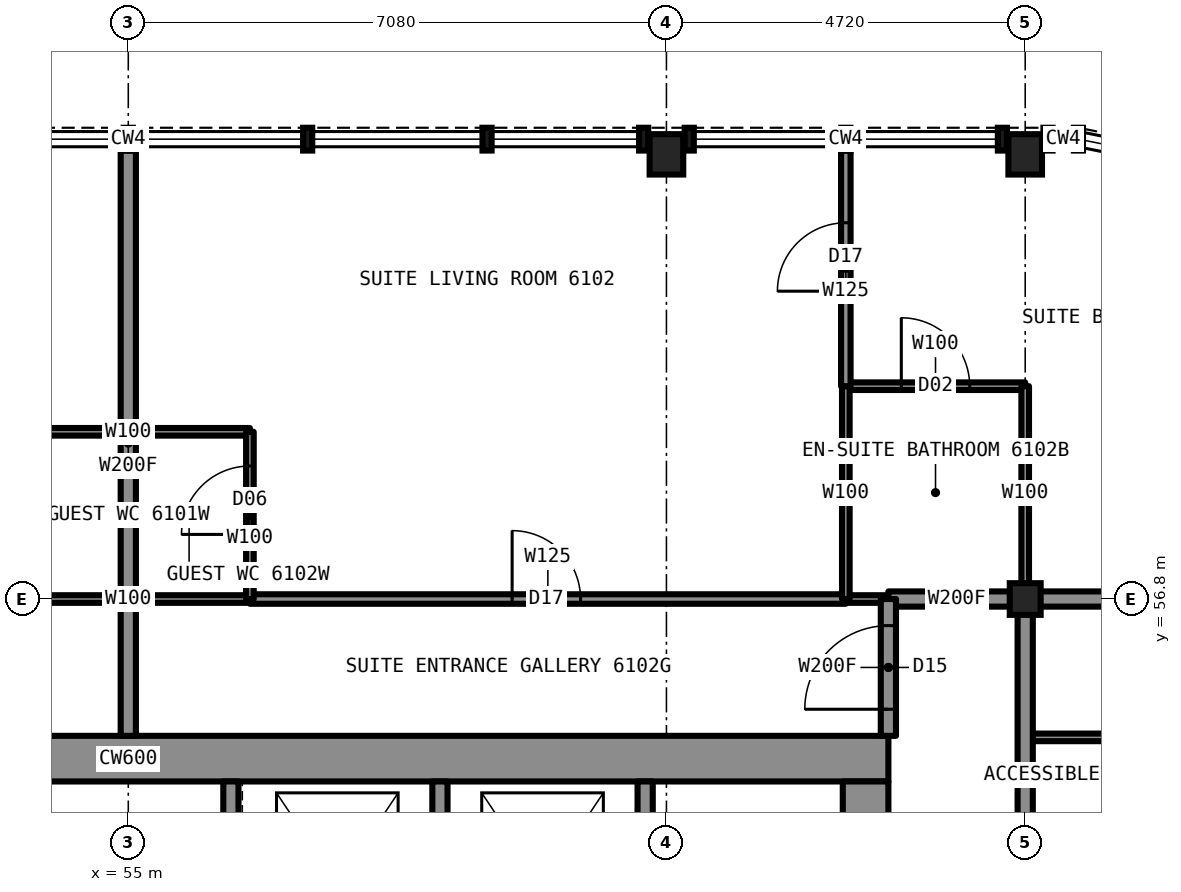
"""IFC4 building model, lengths in metres.
Left out: names, types, materials, properties, quantities, classifications, styles, units other than length and angle.
Written with IfcOpenShell. Run it as: python <this file> out.ifc"""

import sys

from ifc_helpers import new_model, si_unit, direction, frame, frame_2d, origin, origin_2d, place, context, subcontext, project, spatial, rectangle, i_section, extrude, element, fill, save


model = new_model("IFC4")
c1 = context("Model", 3, precision=1e-05, world=origin(), true_north=direction((0.0, 1.0)))
c2 = subcontext(c1, "Body", "Model", "MODEL_VIEW")
j1 = project(units=[si_unit("LENGTHUNIT", "METRE"), si_unit("PLANEANGLEUNIT", "RADIAN")], contexts=[c1])
p1 = place(None, origin())
s1 = spatial("IfcSite", under=j1, at=p1, CompositionType="ELEMENT")
p2 = place(p1, origin())
s2 = spatial("IfcBuilding", under=s1, at=p2, CompositionType="ELEMENT")
p3 = place(p2, frame((0.0, 0.0, 226.7)))
s3 = spatial("IfcBuildingStorey", under=s2, at=p3, CompositionType="ELEMENT", Elevation=226.7)
for number, where, z_axis, x_axis in (
    (1, (62.08, 62.65, 0.0), (0.0, 0.0, 1.0), (1.0, 0.0, 0.0)),
    (2, (66.8, 62.65, 0.0), (0.0, 0.0, 1.0), (1.0, 0.0, 0.0)),
):
    element("IfcColumn", number, at=place(p3, frame(where, z_axis=z_axis, x_axis=x_axis)), inside=s3, PredefinedType="COLUMN", context=c2, shape_type="SweptSolid", body=[
        extrude(i_section(OverallWidth=0.442, OverallDepth=0.531, WebThickness=0.066, FlangeThickness=0.106, at=origin_2d()), origin(), (0.0, 0.0, 1.0), 3.5),
    ])
p4 = place(p3, frame((66.8, 56.8, 0.0), z_axis=(0.0, 0.0, 1.0), x_axis=(1.0, 0.0, 0.0)))
e3 = element("IfcColumn", 3, at=p4, inside=s3, PredefinedType="COLUMN", context=c2, shape_type="SweptSolid", body=[
    extrude(i_section(OverallWidth=0.406, OverallDepth=0.417, WebThickness=0.03, FlangeThickness=0.048, at=origin_2d()), origin(), (0.0, 0.0, 1.0), 3.5),
])
p5 = place(p3, frame((45.0, 54.7, 0.0), z_axis=(0.0, 0.0, 1.0), x_axis=(1.0, 0.0, 0.0)))
e4 = element("IfcWall", 4, at=p5, inside=s3, PredefinedType="SHEAR", context=c2, shape_type="SweptSolid", body=[
    extrude(rectangle(XDim=20.0, YDim=0.6, at=frame_2d((10.0, 0.0))), origin(), (0.0, 0.0, 1.0), 3.5),
])
p6 = place(p3, frame((64.7, 35.6, 0.0), z_axis=(0.0, 0.0, 1.0), x_axis=(0.0, 1.0, 0.0)))
e5 = element("IfcWall", 5, at=p6, inside=s3, PredefinedType="SHEAR", context=c2, shape_type="SweptSolid", body=[
    extrude(rectangle(XDim=18.8, YDim=0.6, at=frame_2d((9.4, 0.0))), origin(), (0.0, 0.0, 1.0), 3.5),
])
p7 = place(p6, frame((13.4, 0.0, 0.0)))
e6 = element("IfcOpeningElement", 6, at=p7, cuts=e5, PredefinedType="OPENING", context=c2, shape_type="SweptSolid", body=[
    extrude(rectangle(XDim=1.8, YDim=2.2, at=frame_2d((0.9, 1.1))), frame((0.0, 0.31, 0.0), z_axis=(0.0, -1.0, 0.0), x_axis=(1.0, 0.0, 0.0)), (0.0, 0.0, 1.0), 0.62),
])
p8 = place(p6, frame((3.6, 0.0, 0.0)))
e7 = element("IfcOpeningElement", 7, at=p8, cuts=e5, PredefinedType="OPENING", context=c2, shape_type="SweptSolid", body=[
    extrude(rectangle(XDim=1.8, YDim=2.2, at=frame_2d((0.9, 1.1))), frame((0.0, 0.31, 0.0), z_axis=(0.0, -1.0, 0.0), x_axis=(1.0, 0.0, 0.0)), (0.0, 0.0, 1.0), 0.62),
])
p9 = place(p3, frame((53.4, 56.8, 0.0), z_axis=(0.0, 0.0, 1.0), x_axis=(1.0, 0.0, 0.0)))
e8 = element("IfcWall", 8, at=p9, inside=s3, PredefinedType="PARTITIONING", context=c2, shape_type="SweptSolid", body=[
    extrude(rectangle(XDim=3.2, YDim=0.1, at=frame_2d((1.6, 0.0))), origin(), (0.0, 0.0, 1.0), 3.33),
])
p10 = place(p3, frame((64.44, 56.8, 0.0), z_axis=(0.0, 0.0, 1.0), x_axis=(1.0, 0.0, 0.0)))
e9 = element("IfcWall", 9, at=p10, inside=s3, PredefinedType="PARTITIONING", context=c2, shape_type="SweptSolid", body=[
    extrude(rectangle(XDim=0.56, YDim=0.1, at=frame_2d((0.28, 0.0))), origin(), (0.0, 0.0, 1.0), 3.33),
])
p11 = place(p3, frame((65.0, 56.8, 0.0), z_axis=(0.0, 0.0, 1.0), x_axis=(1.0, 0.0, 0.0)))
e10 = element("IfcWall", 10, at=p11, inside=s3, PredefinedType="PARTITIONING", context=c2, shape_type="SweptSolid", body=[
    extrude(rectangle(XDim=1.8, YDim=0.2, at=frame_2d((0.9, 0.0))), origin(), (0.0, 0.0, 1.0), 3.33),
])
p12 = place(p3, frame((66.8, 56.8, 0.0), z_axis=(0.0, 0.0, 1.0), x_axis=(1.0, 0.0, 0.0)))
e11 = element("IfcWall", 11, at=p12, inside=s3, PredefinedType="PARTITIONING", context=c2, shape_type="SweptSolid", body=[
    extrude(rectangle(XDim=5.9, YDim=0.2, at=frame_2d((2.95, 0.0))), origin(), (0.0, 0.0, 1.0), 2.573),
])
p13 = place(p3, frame((56.6, 56.8, 0.0), z_axis=(0.0, 0.0, 1.0), x_axis=(1.0, 0.0, 0.0)))
e12 = element("IfcWall", 12, at=p13, inside=s3, PredefinedType="PARTITIONING", context=c2, shape_type="SweptSolid", body=[
    extrude(rectangle(XDim=7.84, YDim=0.125, at=frame_2d((3.92, 0.0))), origin(), (0.0, 0.0, 1.0), 3.33),
])
p14 = place(p13, frame((3.45, 0.0, 0.0)))
e13 = element("IfcOpeningElement", 13, at=p14, cuts=e12, PredefinedType="OPENING", context=c2, shape_type="SweptSolid", body=[
    extrude(rectangle(XDim=0.9, YDim=2.2, at=frame_2d((0.45, 1.1))), frame((0.0, 0.073, 0.0), z_axis=(0.0, -1.0, 0.0), x_axis=(1.0, 0.0, 0.0)), (0.0, 0.0, 1.0), 0.145),
])
p15 = place(p3, frame((53.4, 59.0, 0.0), z_axis=(0.0, 0.0, 1.0), x_axis=(1.0, 0.0, 0.0)))
e14 = element("IfcWall", 14, at=p15, inside=s3, PredefinedType="PARTITIONING", context=c2, shape_type="SweptSolid", body=[
    extrude(rectangle(XDim=3.2, YDim=0.1, at=frame_2d((1.6, 0.0))), origin(), (0.0, 0.0, 1.0), 3.33),
])
p16 = place(p3, frame((64.44, 59.6, 0.0), z_axis=(0.0, 0.0, 1.0), x_axis=(1.0, 0.0, 0.0)))
e15 = element("IfcWall", 15, at=p16, inside=s3, PredefinedType="PARTITIONING", context=c2, shape_type="SweptSolid", body=[
    extrude(rectangle(XDim=2.36, YDim=0.1, at=frame_2d((1.18, 0.0))), origin(), (0.0, 0.0, 1.0), 3.33),
])
p17 = place(p16, frame((0.73, 0.0, 0.0)))
e16 = element("IfcOpeningElement", 16, at=p17, cuts=e15, PredefinedType="OPENING", context=c2, shape_type="SweptSolid", body=[
    extrude(rectangle(XDim=0.9, YDim=2.1, at=frame_2d((0.45, 1.05))), frame((0.0, 0.06, 0.0), z_axis=(0.0, -1.0, 0.0), x_axis=(1.0, 0.0, 0.0)), (0.0, 0.0, 1.0), 0.12),
])
p18 = place(p3, frame((66.8, 54.98, 0.0), z_axis=(0.0, 0.0, 1.0), x_axis=(1.0, 0.0, 0.0)))
e17 = element("IfcWall", 17, at=p18, inside=s3, PredefinedType="PARTITIONING", context=c2, shape_type="SweptSolid", body=[
    extrude(rectangle(XDim=3.0, YDim=0.1, at=frame_2d((1.5, 0.0))), origin(), (0.0, 0.0, 1.0), 3.33),
])
p19 = place(p3, frame((55.0, 55.0, 0.0), z_axis=(0.0, 0.0, 1.0), x_axis=(0.0, 1.0, 0.0)))
e18 = element("IfcWall", 18, at=p19, inside=s3, PredefinedType="PARTITIONING", context=c2, shape_type="SweptSolid", body=[
    extrude(rectangle(XDim=7.7, YDim=0.2, at=frame_2d((3.85, 0.0))), origin(), (0.0, 0.0, 1.0), 2.573),
])
p20 = place(p3, frame((56.6, 56.8, 0.0), z_axis=(0.0, 0.0, 1.0), x_axis=(0.0, 1.0, 0.0)))
e19 = element("IfcWall", 19, at=p20, inside=s3, PredefinedType="PARTITIONING", context=c2, shape_type="SweptSolid", body=[
    extrude(rectangle(XDim=2.2, YDim=0.1, at=frame_2d((1.1, 0.0))), origin(), (0.0, 0.0, 1.0), 3.33),
])
p21 = place(p20, frame((0.85, 0.0, 0.0)))
e20 = element("IfcOpeningElement", 20, at=p21, cuts=e19, PredefinedType="OPENING", context=c2, shape_type="SweptSolid", body=[
    extrude(rectangle(XDim=0.9, YDim=2.1, at=frame_2d((0.45, 1.05))), frame((0.0, 0.06, 0.0), z_axis=(0.0, -1.0, 0.0), x_axis=(1.0, 0.0, 0.0)), (0.0, 0.0, 1.0), 0.12),
])
p22 = place(p3, frame((65.0, 55.0, 0.0), z_axis=(0.0, 0.0, 1.0), x_axis=(0.0, 1.0, 0.0)))
e21 = element("IfcWall", 21, at=p22, inside=s3, PredefinedType="PARTITIONING", context=c2, shape_type="SweptSolid", body=[
    extrude(rectangle(XDim=1.8, YDim=0.2, at=frame_2d((0.9, 0.0))), origin(), (0.0, 0.0, 1.0), 3.33),
])
p23 = place(p22, frame((0.35, 0.0, 0.0)))
e22 = element("IfcOpeningElement", 22, at=p23, cuts=e21, PredefinedType="OPENING", context=c2, shape_type="SweptSolid", body=[
    extrude(rectangle(XDim=1.1, YDim=2.2, at=frame_2d((0.55, 1.1))), frame((0.0, 0.11, 0.0), z_axis=(0.0, -1.0, 0.0), x_axis=(1.0, 0.0, 0.0)), (0.0, 0.0, 1.0), 0.22),
])
p24 = place(p3, frame((66.8, 56.8, 0.0), z_axis=(0.0, 0.0, 1.0), x_axis=(0.0, 1.0, 0.0)))
e23 = element("IfcWall", 23, at=p24, inside=s3, PredefinedType="PARTITIONING", context=c2, shape_type="SweptSolid", body=[
    extrude(rectangle(XDim=2.8, YDim=0.1, at=frame_2d((1.4, 0.0))), origin(), (0.0, 0.0, 1.0), 2.573),
])
p25 = place(p3, frame((66.8, 33.2, 0.0), z_axis=(0.0, 0.0, 1.0), x_axis=(0.0, 1.0, 0.0)))
e24 = element("IfcWall", 24, at=p25, inside=s3, PredefinedType="PARTITIONING", context=c2, shape_type="SweptSolid", body=[
    extrude(rectangle(XDim=23.6, YDim=0.2, at=frame_2d((11.8, 0.0))), origin(), (0.0, 0.0, 1.0), 3.33),
])
p26 = place(p25, frame((8.85, 0.0, 0.0)))
e25 = element("IfcOpeningElement", 25, at=p26, cuts=e24, PredefinedType="OPENING", context=c2, shape_type="SweptSolid", body=[
    extrude(rectangle(XDim=1.1, YDim=2.2, at=frame_2d((0.55, 1.1))), frame((0.0, 0.11, 0.0), z_axis=(0.0, -1.0, 0.0), x_axis=(1.0, 0.0, 0.0)), (0.0, 0.0, 1.0), 0.22),
])
p27 = place(p25, frame((13.65, 0.0, 0.0)))
e26 = element("IfcOpeningElement", 26, at=p27, cuts=e24, PredefinedType="OPENING", context=c2, shape_type="SweptSolid", body=[
    extrude(rectangle(XDim=1.1, YDim=2.2, at=frame_2d((0.55, 1.1))), frame((0.0, 0.11, 0.0), z_axis=(0.0, -1.0, 0.0), x_axis=(1.0, 0.0, 0.0)), (0.0, 0.0, 1.0), 0.22),
])
p28 = place(p3, frame((64.44, 56.8, 0.0), z_axis=(0.0, 0.0, 1.0), x_axis=(0.0, 1.0, 0.0)))
e27 = element("IfcWall", 27, at=p28, inside=s3, PredefinedType="PARTITIONING", context=c2, shape_type="SweptSolid", body=[
    extrude(rectangle(XDim=2.8, YDim=0.1, at=frame_2d((1.4, 0.0))), origin(), (0.0, 0.0, 1.0), 3.33),
])
p29 = place(p3, frame((64.44, 59.6, 0.0), z_axis=(0.0, 0.0, 1.0), x_axis=(0.0, 1.0, 0.0)))
e28 = element("IfcWall", 28, at=p29, inside=s3, PredefinedType="PARTITIONING", context=c2, shape_type="SweptSolid", body=[
    extrude(rectangle(XDim=3.1, YDim=0.125, at=frame_2d((1.55, 0.0))), origin(), (0.0, 0.0, 1.0), 3.33),
])
p30 = place(p29, frame((1.25, 0.0, 0.0)))
e29 = element("IfcOpeningElement", 29, at=p30, cuts=e28, PredefinedType="OPENING", context=c2, shape_type="SweptSolid", body=[
    extrude(rectangle(XDim=0.9, YDim=2.2, at=frame_2d((0.45, 1.1))), frame((0.0, 0.073, 0.0), z_axis=(0.0, -1.0, 0.0), x_axis=(1.0, 0.0, 0.0)), (0.0, 0.0, 1.0), 0.145),
])
for number, where, z_axis, x_axis in (
    (30, (59.1, 51.7, 0.0), (0.0, 0.0, 1.0), (0.0, 1.0, 0.0)),
    (31, (61.8, 51.7, 0.0), (0.0, 0.0, 1.0), (0.0, 1.0, 0.0)),
    (32, (56.35, 51.7, 0.0), (0.0, 0.0, 1.0), (0.0, 1.0, 0.0)),
):
    element("IfcWall", number, at=place(p3, frame(where, z_axis=z_axis, x_axis=x_axis)), inside=s3, PredefinedType="PARTITIONING", context=c2, shape_type="SweptSolid", body=[
        extrude(rectangle(XDim=2.7, YDim=0.2, at=frame_2d((1.35, 0.0))), origin(), (0.0, 0.0, 1.0), 3.33),
    ])
p31 = place(p14, origin())
e33 = element("IfcDoor", 33, at=p31, inside=s3, OperationType="SINGLE_SWING_LEFT", PredefinedType="DOOR", context=c2, shape_type="SweptSolid", body=[
    extrude(rectangle(XDim=0.9, YDim=2.2, at=frame_2d((0.45, 1.1))), frame((0.0, 0.025, 0.0), z_axis=(0.0, -1.0, 0.0), x_axis=(1.0, 0.0, 0.0)), (0.0, 0.0, 1.0), 0.05),
])
fill(e13, e33)
p32 = place(p17, origin())
e34 = element("IfcDoor", 34, at=p32, inside=s3, OperationType="SINGLE_SWING_RIGHT", PredefinedType="DOOR", context=c2, shape_type="SweptSolid", body=[
    extrude(rectangle(XDim=0.9, YDim=2.1, at=frame_2d((0.45, 1.05))), frame((0.0, 0.025, 0.0), z_axis=(0.0, -1.0, 0.0), x_axis=(1.0, 0.0, 0.0)), (0.0, 0.0, 1.0), 0.05),
])
fill(e16, e34)
p33 = place(p23, origin())
e35 = element("IfcDoor", 35, at=p33, inside=s3, OperationType="SINGLE_SWING_LEFT", PredefinedType="DOOR", context=c2, shape_type="SweptSolid", body=[
    extrude(rectangle(XDim=1.1, YDim=2.2, at=frame_2d((0.55, 1.1))), frame((0.0, 0.025, 0.0), z_axis=(0.0, -1.0, 0.0), x_axis=(1.0, 0.0, 0.0)), (0.0, 0.0, 1.0), 0.05),
])
fill(e22, e35)
p34 = place(p30, origin())
e36 = element("IfcDoor", 36, at=p34, inside=s3, OperationType="SINGLE_SWING_LEFT", PredefinedType="DOOR", context=c2, shape_type="SweptSolid", body=[
    extrude(rectangle(XDim=0.9, YDim=2.2, at=frame_2d((0.45, 1.1))), frame((0.0, 0.025, 0.0), z_axis=(0.0, -1.0, 0.0), x_axis=(1.0, 0.0, 0.0)), (0.0, 0.0, 1.0), 0.05),
])
fill(e29, e36)
p35 = place(p21, origin())
e37 = element("IfcDoor", 37, at=p35, inside=s3, OperationType="SINGLE_SWING_LEFT", PredefinedType="DOOR", context=c2, shape_type="SweptSolid", body=[
    extrude(rectangle(XDim=0.9, YDim=2.1, at=frame_2d((0.45, 1.05))), frame((0.0, 0.025, 0.0), z_axis=(0.0, -1.0, 0.0), x_axis=(1.0, 0.0, 0.0)), (0.0, 0.0, 1.0), 0.05),
])
fill(e20, e37)
save(model, sys.argv[1])
